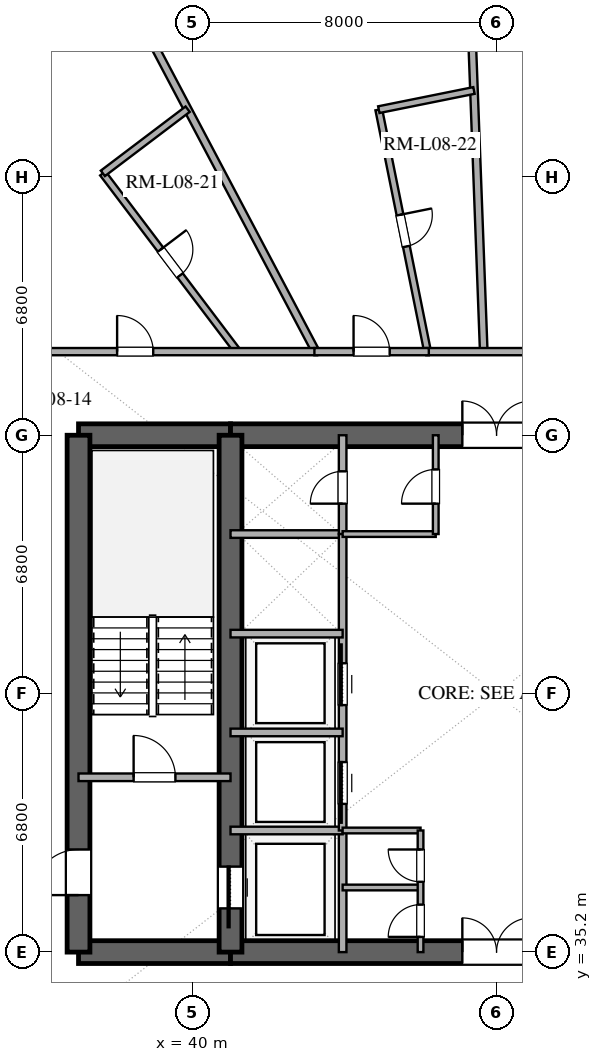
"""IFC4 building model, lengths in metres.
Left out: names, types, materials, properties, quantities, classifications, styles, units other than length and angle.
Written with IfcOpenShell. Run it as: python <this file> out.ifc"""

import sys

from ifc_helpers import new_model, si_unit, direction, frame, frame_2d, origin, place, context, subcontext, project, spatial, rectangle, extrude, element, fill, save


model = new_model("IFC4")
c1 = context("Model", 3, precision=1e-05, world=origin(), true_north=direction((0.0, 1.0)))
c2 = subcontext(c1, "Body", "Model", "MODEL_VIEW")
j1 = project(units=[si_unit("LENGTHUNIT", "METRE"), si_unit("PLANEANGLEUNIT", "RADIAN")], contexts=[c1])
p1 = place(None, origin())
s1 = spatial("IfcSite", under=j1, at=p1, CompositionType="ELEMENT")
p2 = place(p1, origin())
s2 = spatial("IfcBuilding", under=s1, at=p2, CompositionType="ELEMENT")
p3 = place(p2, frame((0.0, 0.0, 39.0)))
s3 = spatial("IfcBuildingStorey", under=s2, at=p3, CompositionType="ELEMENT", Elevation=39.0)
p4 = place(p3, frame((37.0, 35.2, 0.0), z_axis=(0.0, 0.0, 1.0), x_axis=(1.0, 0.0, 0.0)))
e1 = element("IfcWall", 1, at=p4, inside=s3, PredefinedType="SHEAR", context=c2, shape_type="SweptSolid", body=[
    extrude(rectangle(XDim=4.0, YDim=0.6, at=frame_2d((2.0, 0.0))), origin(), (0.0, 0.0, 1.0), 3.38),
])
p5 = place(p3, frame((41.0, 35.2, 0.0), z_axis=(0.0, 0.0, 1.0), x_axis=(1.0, 0.0, 0.0)))
e2 = element("IfcWall", 2, at=p5, inside=s3, PredefinedType="SHEAR", context=c2, shape_type="SweptSolid", body=[
    extrude(rectangle(XDim=14.0, YDim=0.6, at=frame_2d((7.0, 0.0))), origin(), (0.0, 0.0, 1.0), 3.38),
])
p6 = place(p5, frame((6.1, 0.0, 0.0)))
e3 = element("IfcOpeningElement", 3, at=p6, cuts=e2, PredefinedType="OPENING", context=c2, shape_type="SweptSolid", body=[
    extrude(rectangle(XDim=1.8, YDim=2.25, at=frame_2d((0.9, 1.125))), frame((0.0, 0.31, 0.0), z_axis=(0.0, -1.0, 0.0), x_axis=(1.0, 0.0, 0.0)), (0.0, 0.0, 1.0), 0.62),
])
p7 = place(p3, frame((37.0, 48.8, 0.0), z_axis=(0.0, 0.0, 1.0), x_axis=(1.0, 0.0, 0.0)))
e4 = element("IfcWall", 4, at=p7, inside=s3, PredefinedType="SHEAR", context=c2, shape_type="SweptSolid", body=[
    extrude(rectangle(XDim=4.0, YDim=0.6, at=frame_2d((2.0, 0.0))), origin(), (0.0, 0.0, 1.0), 3.38),
])
p8 = place(p3, frame((41.0, 48.8, 0.0), z_axis=(0.0, 0.0, 1.0), x_axis=(1.0, 0.0, 0.0)))
e5 = element("IfcWall", 5, at=p8, inside=s3, PredefinedType="SHEAR", context=c2, shape_type="SweptSolid", body=[
    extrude(rectangle(XDim=14.0, YDim=0.6, at=frame_2d((7.0, 0.0))), origin(), (0.0, 0.0, 1.0), 3.38),
])
p9 = place(p8, frame((6.1, 0.0, 0.0)))
e6 = element("IfcOpeningElement", 6, at=p9, cuts=e5, PredefinedType="OPENING", context=c2, shape_type="SweptSolid", body=[
    extrude(rectangle(XDim=1.8, YDim=2.25, at=frame_2d((0.9, 1.125))), frame((0.0, 0.31, 0.0), z_axis=(0.0, -1.0, 0.0), x_axis=(1.0, 0.0, 0.0)), (0.0, 0.0, 1.0), 0.62),
])
p10 = place(p3, frame((37.0, 35.2, 0.0), z_axis=(0.0, 0.0, 1.0), x_axis=(0.0, 1.0, 0.0)))
e7 = element("IfcWall", 7, at=p10, inside=s3, PredefinedType="SHEAR", context=c2, shape_type="SweptSolid", body=[
    extrude(rectangle(XDim=13.6, YDim=0.6, at=frame_2d((6.8, 0.0))), origin(), (0.0, 0.0, 1.0), 3.38),
])
p11 = place(p10, frame((1.5, 0.0, 0.0)))
e8 = element("IfcOpeningElement", 8, at=p11, cuts=e7, PredefinedType="OPENING", context=c2, shape_type="SweptSolid", body=[
    extrude(rectangle(XDim=1.2, YDim=2.15, at=frame_2d((0.6, 1.075))), frame((0.0, 0.31, 0.0), z_axis=(0.0, -1.0, 0.0), x_axis=(1.0, 0.0, 0.0)), (0.0, 0.0, 1.0), 0.62),
])
p12 = place(p3, frame((41.0, 35.2, 0.0), z_axis=(0.0, 0.0, 1.0), x_axis=(0.0, 1.0, 0.0)))
e9 = element("IfcWall", 9, at=p12, inside=s3, PredefinedType="SHEAR", context=c2, shape_type="SweptSolid", body=[
    extrude(rectangle(XDim=13.6, YDim=0.6, at=frame_2d((6.8, 0.0))), origin(), (0.0, 0.0, 1.0), 3.38),
])
p13 = place(p12, frame((1.15, 0.0, 0.0)))
e10 = element("IfcOpeningElement", 10, at=p13, cuts=e9, PredefinedType="OPENING", context=c2, shape_type="SweptSolid", body=[
    extrude(rectangle(XDim=1.1, YDim=2.2, at=frame_2d((0.55, 1.1))), frame((0.0, 0.31, 0.0), z_axis=(0.0, -1.0, 0.0), x_axis=(1.0, 0.0, 0.0)), (0.0, 0.0, 1.0), 0.62),
])
p14 = place(p3, frame((37.0, 39.8, 0.0), z_axis=(0.0, 0.0, 1.0), x_axis=(1.0, 0.0, 0.0)))
e11 = element("IfcWall", 11, at=p14, inside=s3, PredefinedType="SOLIDWALL", context=c2, shape_type="SweptSolid", body=[
    extrude(rectangle(XDim=4.0, YDim=0.2, at=frame_2d((2.0, 0.0))), origin(), (0.0, 0.0, 1.0), 2.74),
])
p15 = place(p14, frame((1.45, 0.0, 0.0)))
e12 = element("IfcOpeningElement", 12, at=p15, cuts=e11, PredefinedType="OPENING", context=c2, shape_type="SweptSolid", body=[
    extrude(rectangle(XDim=1.1, YDim=2.15, at=frame_2d((0.55, 1.075))), frame((0.0, 0.11, 0.0), z_axis=(0.0, -1.0, 0.0), x_axis=(1.0, 0.0, 0.0)), (0.0, 0.0, 1.0), 0.22),
])
p16 = place(p3, frame((43.95, 35.2, 0.0), z_axis=(0.0, 0.0, 1.0), x_axis=(0.0, 1.0, 0.0)))
e13 = element("IfcWall", 13, at=p16, inside=s3, PredefinedType="SOLIDWALL", context=c2, shape_type="SweptSolid", body=[
    extrude(rectangle(XDim=3.2, YDim=0.2, at=frame_2d((1.6, 0.0))), origin(), (0.0, 0.0, 1.0), 2.74),
])
for number, where, z_axis, x_axis in (
    (14, (41.0, 38.4, 0.0), (0.0, 0.0, 1.0), (1.0, 0.0, 0.0)),
    (15, (41.0, 46.2, 0.0), (0.0, 0.0, 1.0), (1.0, 0.0, 0.0)),
):
    element("IfcWall", number, at=place(p3, frame(where, z_axis=z_axis, x_axis=x_axis)), inside=s3, PredefinedType="SOLIDWALL", context=c2, shape_type="SweptSolid", body=[
        extrude(rectangle(XDim=2.95, YDim=0.2, at=frame_2d((1.475, 0.0))), origin(), (0.0, 0.0, 1.0), 2.74),
    ])
p17 = place(p3, frame((43.95, 46.2, 0.0), z_axis=(0.0, 0.0, 1.0), x_axis=(0.0, 1.0, 0.0)))
e16 = element("IfcWall", 16, at=p17, inside=s3, PredefinedType="SOLIDWALL", context=c2, shape_type="SweptSolid", body=[
    extrude(rectangle(XDim=2.6, YDim=0.2, at=frame_2d((1.3, 0.0))), origin(), (0.0, 0.0, 1.0), 2.74),
])
p18 = place(p17, frame((0.8, 0.0, 0.0)))
e17 = element("IfcOpeningElement", 17, at=p18, cuts=e16, PredefinedType="OPENING", context=c2, shape_type="SweptSolid", body=[
    extrude(rectangle(XDim=0.85, YDim=2.15, at=frame_2d((0.425, 1.075))), frame((0.0, 0.11, 0.0), z_axis=(0.0, -1.0, 0.0), x_axis=(1.0, 0.0, 0.0)), (0.0, 0.0, 1.0), 0.22),
])
p19 = place(p3, frame((43.95, 38.4, 0.0), z_axis=(0.0, 0.0, 1.0), x_axis=(0.0, 1.0, 0.0)))
e18 = element("IfcWall", 18, at=p19, inside=s3, PredefinedType="SOLIDWALL", context=c2, shape_type="SweptSolid", body=[
    extrude(rectangle(XDim=7.8, YDim=0.2, at=frame_2d((3.9, 0.0))), origin(), (0.0, 0.0, 1.0), 2.74),
])
p20 = place(p19, frame((0.7, 0.0, 0.0)))
e19 = element("IfcOpeningElement", 19, at=p20, cuts=e18, PredefinedType="OPENING", context=c2, shape_type="SweptSolid", body=[
    extrude(rectangle(XDim=1.1, YDim=2.2, at=frame_2d((0.55, 1.1))), frame((0.0, 0.11, 0.0), z_axis=(0.0, -1.0, 0.0), x_axis=(1.0, 0.0, 0.0)), (0.0, 0.0, 1.0), 0.22),
])
p21 = place(p19, frame((3.3, 0.0, 0.0)))
e20 = element("IfcOpeningElement", 20, at=p21, cuts=e18, PredefinedType="OPENING", context=c2, shape_type="SweptSolid", body=[
    extrude(rectangle(XDim=1.1, YDim=2.2, at=frame_2d((0.55, 1.1))), frame((0.0, 0.11, 0.0), z_axis=(0.0, -1.0, 0.0), x_axis=(1.0, 0.0, 0.0)), (0.0, 0.0, 1.0), 0.22),
])
for number, where, z_axis, x_axis in (
    (21, (41.0, 40.98, 0.0), (0.0, 0.0, 1.0), (1.0, 0.0, 0.0)),
    (22, (41.0, 43.58, 0.0), (0.0, 0.0, 1.0), (1.0, 0.0, 0.0)),
):
    element("IfcWall", number, at=place(p3, frame(where, z_axis=z_axis, x_axis=x_axis)), inside=s3, PredefinedType="SOLIDWALL", context=c2, shape_type="SweptSolid", body=[
        extrude(rectangle(XDim=2.95, YDim=0.2, at=frame_2d((1.475, 0.0))), origin(), (0.0, 0.0, 1.0), 2.74),
    ])
for number, where, z_axis, x_axis in (
    (23, (43.95, 36.9, 0.0), (0.0, 0.0, 1.0), (1.0, 0.0, 0.0)),
    (24, (43.95, 38.4, 0.0), (0.0, 0.0, 1.0), (1.0, 0.0, 0.0)),
):
    element("IfcWall", number, at=place(p3, frame(where, z_axis=z_axis, x_axis=x_axis)), inside=s3, PredefinedType="PARTITIONING", context=c2, shape_type="SweptSolid", body=[
        extrude(rectangle(XDim=2.05, YDim=0.15, at=frame_2d((1.025, 0.0))), origin(), (0.0, 0.0, 1.0), 2.74),
    ])
p22 = place(p3, frame((46.0, 35.2, 0.0), z_axis=(0.0, 0.0, 1.0), x_axis=(0.0, 1.0, 0.0)))
e25 = element("IfcWall", 25, at=p22, inside=s3, PredefinedType="PARTITIONING", context=c2, shape_type="SweptSolid", body=[
    extrude(rectangle(XDim=3.2, YDim=0.15, at=frame_2d((1.6, 0.0))), origin(), (0.0, 0.0, 1.0), 2.74),
])
p23 = place(p22, frame((0.4, 0.0, 0.0)))
e26 = element("IfcOpeningElement", 26, at=p23, cuts=e25, PredefinedType="OPENING", context=c2, shape_type="SweptSolid", body=[
    extrude(rectangle(XDim=0.85, YDim=2.15, at=frame_2d((0.425, 1.075))), frame((0.0, 0.085, 0.0), z_axis=(0.0, -1.0, 0.0), x_axis=(1.0, 0.0, 0.0)), (0.0, 0.0, 1.0), 0.17),
])
p24 = place(p22, frame((1.85, 0.0, 0.0)))
e27 = element("IfcOpeningElement", 27, at=p24, cuts=e25, PredefinedType="OPENING", context=c2, shape_type="SweptSolid", body=[
    extrude(rectangle(XDim=0.85, YDim=2.15, at=frame_2d((0.425, 1.075))), frame((0.0, 0.085, 0.0), z_axis=(0.0, -1.0, 0.0), x_axis=(1.0, 0.0, 0.0)), (0.0, 0.0, 1.0), 0.17),
])
p25 = place(p3, frame((43.95, 46.2, 0.0), z_axis=(0.0, 0.0, 1.0), x_axis=(1.0, 0.0, 0.0)))
e28 = element("IfcWall", 28, at=p25, inside=s3, PredefinedType="PARTITIONING", context=c2, shape_type="SweptSolid", body=[
    extrude(rectangle(XDim=2.45, YDim=0.15, at=frame_2d((1.225, 0.0))), origin(), (0.0, 0.0, 1.0), 2.74),
])
p26 = place(p3, frame((46.4, 46.2, 0.0), z_axis=(0.0, 0.0, 1.0), x_axis=(0.0, 1.0, 0.0)))
e29 = element("IfcWall", 29, at=p26, inside=s3, PredefinedType="PARTITIONING", context=c2, shape_type="SweptSolid", body=[
    extrude(rectangle(XDim=2.6, YDim=0.15, at=frame_2d((1.3, 0.0))), origin(), (0.0, 0.0, 1.0), 2.74),
])
p27 = place(p26, frame((0.8, 0.0, 0.0)))
e30 = element("IfcOpeningElement", 30, at=p27, cuts=e29, PredefinedType="OPENING", context=c2, shape_type="SweptSolid", body=[
    extrude(rectangle(XDim=0.9, YDim=2.15, at=frame_2d((0.45, 1.075))), frame((0.0, 0.085, 0.0), z_axis=(0.0, -1.0, 0.0), x_axis=(1.0, 0.0, 0.0)), (0.0, 0.0, 1.0), 0.17),
])
p28 = place(p3, frame((47.663, 51.0, 0.0), z_axis=(0.0, 0.0, 1.0), x_axis=(-0.037384345878, 0.999300961014, 0.0)))
e31 = element("IfcWall", 31, at=p28, inside=s3, PredefinedType="PARTITIONING", context=c2, shape_type="SweptSolid", body=[
    extrude(rectangle(XDim=14.877, YDim=0.2, at=frame_2d((7.438, 0.0))), origin(), (0.0, 0.0, 1.0), 2.74),
])
p29 = place(p3, frame((43.243, 51.0, 0.0), z_axis=(0.0, 0.0, 1.0), x_axis=(-0.467270516294, 0.884114395654, 0.0)))
e32 = element("IfcWall", 32, at=p29, inside=s3, PredefinedType="PARTITIONING", context=c2, shape_type="SweptSolid", body=[
    extrude(rectangle(XDim=14.96, YDim=0.2, at=frame_2d((7.48, 0.0))), origin(), (0.0, 0.0, 1.0), 2.74),
])
p30 = place(p3, frame((44.902, 57.367, 0.0), z_axis=(0.0, 0.0, 1.0), x_axis=(0.197648412503, -0.980272974755, 0.0)))
e33 = element("IfcWall", 33, at=p30, inside=s3, PredefinedType="PLUMBINGWALL", context=c2, shape_type="SweptSolid", body=[
    extrude(rectangle(XDim=6.495, YDim=0.18, at=frame_2d((3.248, 0.0))), origin(), (0.0, 0.0, 1.0), 2.74),
])
p31 = place(p30, frame((2.823, 0.0, 0.0)))
e34 = element("IfcOpeningElement", 34, at=p31, cuts=e33, PredefinedType="OPENING", context=c2, shape_type="SweptSolid", body=[
    extrude(rectangle(XDim=0.85, YDim=2.1, at=frame_2d((0.425, 1.05))), frame((0.0, 0.1, 0.0), z_axis=(0.0, -1.0, 0.0), x_axis=(1.0, 0.0, 0.0)), (0.0, 0.0, 1.0), 0.2),
])
p32 = place(p3, frame((37.64, 55.691, 0.0), z_axis=(0.0, 0.0, 1.0), x_axis=(0.603401299207, -0.797437691682, 0.0)))
e35 = element("IfcWall", 35, at=p32, inside=s3, PredefinedType="PLUMBINGWALL", context=c2, shape_type="SweptSolid", body=[
    extrude(rectangle(XDim=5.882, YDim=0.18, at=frame_2d((2.941, 0.0))), origin(), (0.0, 0.0, 1.0), 2.74),
])
p33 = place(p32, frame((2.516, 0.0, 0.0)))
e36 = element("IfcOpeningElement", 36, at=p33, cuts=e35, PredefinedType="OPENING", context=c2, shape_type="SweptSolid", body=[
    extrude(rectangle(XDim=0.85, YDim=2.1, at=frame_2d((0.425, 1.05))), frame((0.0, 0.1, 0.0), z_axis=(0.0, -1.0, 0.0), x_axis=(1.0, 0.0, 0.0)), (0.0, 0.0, 1.0), 0.2),
])
p34 = place(p3, frame((34.8, 51.0, 0.0), z_axis=(0.0, 0.0, 1.0), x_axis=(1.0, 0.0, 0.0)))
e37 = element("IfcWall", 37, at=p34, inside=s3, PredefinedType="PARTITIONING", context=c2, shape_type="SweptSolid", body=[
    extrude(rectangle(XDim=8.479, YDim=0.19, at=frame_2d((4.24, 0.0))), origin(), (0.0, 0.0, 1.0), 2.74),
])
p35 = place(p34, frame((3.216, 0.0, 0.0)))
e38 = element("IfcOpeningElement", 38, at=p35, cuts=e37, PredefinedType="OPENING", context=c2, shape_type="SweptSolid", body=[
    extrude(rectangle(XDim=0.95, YDim=2.15, at=frame_2d((0.475, 1.075))), frame((0.0, 0.105, 0.0), z_axis=(0.0, -1.0, 0.0), x_axis=(1.0, 0.0, 0.0)), (0.0, 0.0, 1.0), 0.21),
])
p36 = place(p3, frame((46.153, 51.0, 0.0), z_axis=(0.0, 0.0, 1.0), x_axis=(1.0, 0.0, 0.0)))
e39 = element("IfcWall", 39, at=p36, inside=s3, PredefinedType="PARTITIONING", context=c2, shape_type="SweptSolid", body=[
    extrude(rectangle(XDim=15.047, YDim=0.19, at=frame_2d((7.524, 0.0))), origin(), (0.0, 0.0, 1.0), 2.74),
])
p37 = place(p36, frame((3.144, 0.0, 0.0)))
e40 = element("IfcOpeningElement", 40, at=p37, cuts=e39, PredefinedType="OPENING", context=c2, shape_type="SweptSolid", body=[
    extrude(rectangle(XDim=1.0, YDim=2.2, at=frame_2d((0.5, 1.1))), frame((0.0, 0.105, 0.0), z_axis=(0.0, -1.0, 0.0), x_axis=(1.0, 0.0, 0.0)), (0.0, 0.0, 1.0), 0.21),
])
p38 = place(p36, frame((7.119, 0.0, 0.0)))
e41 = element("IfcOpeningElement", 41, at=p38, cuts=e39, PredefinedType="OPENING", context=c2, shape_type="SweptSolid", body=[
    extrude(rectangle(XDim=0.95, YDim=2.15, at=frame_2d((0.475, 1.075))), frame((0.0, 0.105, 0.0), z_axis=(0.0, -1.0, 0.0), x_axis=(1.0, 0.0, 0.0)), (0.0, 0.0, 1.0), 0.21),
])
p39 = place(p3, frame((43.207, 51.0, 0.0), z_axis=(0.0, 0.0, 1.0), x_axis=(1.0, 0.0, 0.0)))
e42 = element("IfcWall", 42, at=p39, inside=s3, PredefinedType="PARTITIONING", context=c2, shape_type="SweptSolid", body=[
    extrude(rectangle(XDim=3.011, YDim=0.19, at=frame_2d((1.505, 0.0))), origin(), (0.0, 0.0, 1.0), 2.74),
])
p40 = place(p39, frame((1.03, 0.0, 0.0)))
e43 = element("IfcOpeningElement", 43, at=p40, cuts=e42, PredefinedType="OPENING", context=c2, shape_type="SweptSolid", body=[
    extrude(rectangle(XDim=0.95, YDim=2.15, at=frame_2d((0.475, 1.075))), frame((0.0, 0.105, 0.0), z_axis=(0.0, -1.0, 0.0), x_axis=(1.0, 0.0, 0.0)), (0.0, 0.0, 1.0), 0.21),
])
p41 = place(p3, frame((39.872, 57.379, 0.0), z_axis=(0.0, 0.0, 1.0), x_axis=(-0.797438154909, -0.603400687019, 0.0)))
e44 = element("IfcWall", 44, at=p41, inside=s3, PredefinedType="PLUMBINGWALL", context=c2, shape_type="SweptSolid", body=[
    extrude(rectangle(XDim=2.798, YDim=0.18, at=frame_2d((1.399, 0.0))), origin(), (0.0, 0.0, 1.0), 2.74),
])
p42 = place(p3, frame((47.406, 57.872, 0.0), z_axis=(0.0, 0.0, 1.0), x_axis=(-0.980278128955, -0.1976228476, 0.0)))
e45 = element("IfcWall", 45, at=p42, inside=s3, PredefinedType="PLUMBINGWALL", context=c2, shape_type="SweptSolid", body=[
    extrude(rectangle(XDim=2.555, YDim=0.18, at=frame_2d((1.277, 0.0))), origin(), (0.0, 0.0, 1.0), 2.74),
])
p43 = place(p13, origin())
e46 = element("IfcDoor", 46, at=p43, inside=s3, OperationType="SLIDING_TO_LEFT", PredefinedType="DOOR", context=c2, shape_type="SweptSolid", body=[
    extrude(rectangle(XDim=1.1, YDim=2.2, at=frame_2d((0.55, 1.1))), frame((0.0, 0.025, 0.0), z_axis=(0.0, -1.0, 0.0), x_axis=(1.0, 0.0, 0.0)), (0.0, 0.0, 1.0), 0.05),
])
fill(e10, e46)
p44 = place(p11, origin())
e47 = element("IfcDoor", 47, at=p44, inside=s3, OperationType="SINGLE_SWING_LEFT", PredefinedType="DOOR", context=c2, shape_type="SweptSolid", body=[
    extrude(rectangle(XDim=1.2, YDim=2.15, at=frame_2d((0.6, 1.075))), frame((0.0, 0.025, 0.0), z_axis=(0.0, -1.0, 0.0), x_axis=(1.0, 0.0, 0.0)), (0.0, 0.0, 1.0), 0.05),
])
fill(e8, e47)
p45 = place(p6, origin())
e48 = element("IfcDoor", 48, at=p45, inside=s3, OperationType="DOUBLE_DOOR_SINGLE_SWING", PredefinedType="DOOR", context=c2, shape_type="SweptSolid", body=[
    extrude(rectangle(XDim=1.8, YDim=2.25, at=frame_2d((0.9, 1.125))), frame((0.0, 0.025, 0.0), z_axis=(0.0, -1.0, 0.0), x_axis=(1.0, 0.0, 0.0)), (0.0, 0.0, 1.0), 0.05),
])
fill(e3, e48)
p46 = place(p9, origin())
e49 = element("IfcDoor", 49, at=p46, inside=s3, OperationType="DOUBLE_DOOR_SINGLE_SWING", PredefinedType="DOOR", context=c2, shape_type="SweptSolid", body=[
    extrude(rectangle(XDim=1.8, YDim=2.25, at=frame_2d((0.9, 1.125))), frame((0.0, 0.025, 0.0), z_axis=(0.0, -1.0, 0.0), x_axis=(1.0, 0.0, 0.0)), (0.0, 0.0, 1.0), 0.05),
])
fill(e6, e49)
p47 = place(p15, origin())
e50 = element("IfcDoor", 50, at=p47, inside=s3, OperationType="SINGLE_SWING_LEFT", PredefinedType="DOOR", context=c2, shape_type="SweptSolid", body=[
    extrude(rectangle(XDim=1.1, YDim=2.15, at=frame_2d((0.55, 1.075))), frame((0.0, 0.025, 0.0), z_axis=(0.0, -1.0, 0.0), x_axis=(1.0, 0.0, 0.0)), (0.0, 0.0, 1.0), 0.05),
])
fill(e12, e50)
p48 = place(p18, origin())
e51 = element("IfcDoor", 51, at=p48, inside=s3, OperationType="SINGLE_SWING_LEFT", PredefinedType="DOOR", context=c2, shape_type="SweptSolid", body=[
    extrude(rectangle(XDim=0.85, YDim=2.15, at=frame_2d((0.425, 1.075))), frame((0.0, 0.025, 0.0), z_axis=(0.0, -1.0, 0.0), x_axis=(1.0, 0.0, 0.0)), (0.0, 0.0, 1.0), 0.05),
])
fill(e17, e51)
p49 = place(p20, origin())
e52 = element("IfcDoor", 52, at=p49, inside=s3, OperationType="SLIDING_TO_LEFT", PredefinedType="DOOR", context=c2, shape_type="SweptSolid", body=[
    extrude(rectangle(XDim=1.1, YDim=2.2, at=frame_2d((0.55, 1.1))), frame((0.0, 0.025, 0.0), z_axis=(0.0, -1.0, 0.0), x_axis=(1.0, 0.0, 0.0)), (0.0, 0.0, 1.0), 0.05),
])
fill(e19, e52)
p50 = place(p21, origin())
e53 = element("IfcDoor", 53, at=p50, inside=s3, OperationType="SLIDING_TO_RIGHT", PredefinedType="DOOR", context=c2, shape_type="SweptSolid", body=[
    extrude(rectangle(XDim=1.1, YDim=2.2, at=frame_2d((0.55, 1.1))), frame((0.0, 0.025, 0.0), z_axis=(0.0, -1.0, 0.0), x_axis=(1.0, 0.0, 0.0)), (0.0, 0.0, 1.0), 0.05),
])
fill(e20, e53)
p51 = place(p23, origin())
e54 = element("IfcDoor", 54, at=p51, inside=s3, OperationType="SINGLE_SWING_LEFT", PredefinedType="DOOR", context=c2, shape_type="SweptSolid", body=[
    extrude(rectangle(XDim=0.85, YDim=2.15, at=frame_2d((0.425, 1.075))), frame((0.0, 0.025, 0.0), z_axis=(0.0, -1.0, 0.0), x_axis=(1.0, 0.0, 0.0)), (0.0, 0.0, 1.0), 0.05),
])
fill(e26, e54)
p52 = place(p24, origin())
e55 = element("IfcDoor", 55, at=p52, inside=s3, OperationType="SINGLE_SWING_RIGHT", PredefinedType="DOOR", context=c2, shape_type="SweptSolid", body=[
    extrude(rectangle(XDim=0.85, YDim=2.15, at=frame_2d((0.425, 1.075))), frame((0.0, 0.025, 0.0), z_axis=(0.0, -1.0, 0.0), x_axis=(1.0, 0.0, 0.0)), (0.0, 0.0, 1.0), 0.05),
])
fill(e27, e55)
p53 = place(p27, origin())
e56 = element("IfcDoor", 56, at=p53, inside=s3, OperationType="SINGLE_SWING_LEFT", PredefinedType="DOOR", context=c2, shape_type="SweptSolid", body=[
    extrude(rectangle(XDim=0.9, YDim=2.15, at=frame_2d((0.45, 1.075))), frame((0.0, 0.025, 0.0), z_axis=(0.0, -1.0, 0.0), x_axis=(1.0, 0.0, 0.0)), (0.0, 0.0, 1.0), 0.05),
])
fill(e30, e56)
p54 = place(p31, origin())
e57 = element("IfcDoor", 57, at=p54, inside=s3, OperationType="SINGLE_SWING_LEFT", PredefinedType="DOOR", context=c2, shape_type="SweptSolid", body=[
    extrude(rectangle(XDim=0.85, YDim=2.1, at=frame_2d((0.425, 1.05))), frame((0.0, 0.025, 0.0), z_axis=(0.0, -1.0, 0.0), x_axis=(1.0, 0.0, 0.0)), (0.0, 0.0, 1.0), 0.05),
])
fill(e34, e57)
p55 = place(p33, origin())
e58 = element("IfcDoor", 58, at=p55, inside=s3, OperationType="SINGLE_SWING_LEFT", PredefinedType="DOOR", context=c2, shape_type="SweptSolid", body=[
    extrude(rectangle(XDim=0.85, YDim=2.1, at=frame_2d((0.425, 1.05))), frame((0.0, 0.025, 0.0), z_axis=(0.0, -1.0, 0.0), x_axis=(1.0, 0.0, 0.0)), (0.0, 0.0, 1.0), 0.05),
])
fill(e36, e58)
p56 = place(p35, origin())
e59 = element("IfcDoor", 59, at=p56, inside=s3, OperationType="SINGLE_SWING_LEFT", PredefinedType="DOOR", context=c2, shape_type="SweptSolid", body=[
    extrude(rectangle(XDim=0.95, YDim=2.15, at=frame_2d((0.475, 1.075))), frame((0.0, 0.025, 0.0), z_axis=(0.0, -1.0, 0.0), x_axis=(1.0, 0.0, 0.0)), (0.0, 0.0, 1.0), 0.05),
])
fill(e38, e59)
p57 = place(p40, origin())
e60 = element("IfcDoor", 60, at=p57, inside=s3, OperationType="SINGLE_SWING_LEFT", PredefinedType="DOOR", context=c2, shape_type="SweptSolid", body=[
    extrude(rectangle(XDim=0.95, YDim=2.15, at=frame_2d((0.475, 1.075))), frame((0.0, 0.025, 0.0), z_axis=(0.0, -1.0, 0.0), x_axis=(1.0, 0.0, 0.0)), (0.0, 0.0, 1.0), 0.05),
])
fill(e43, e60)
save(model, sys.argv[1])
